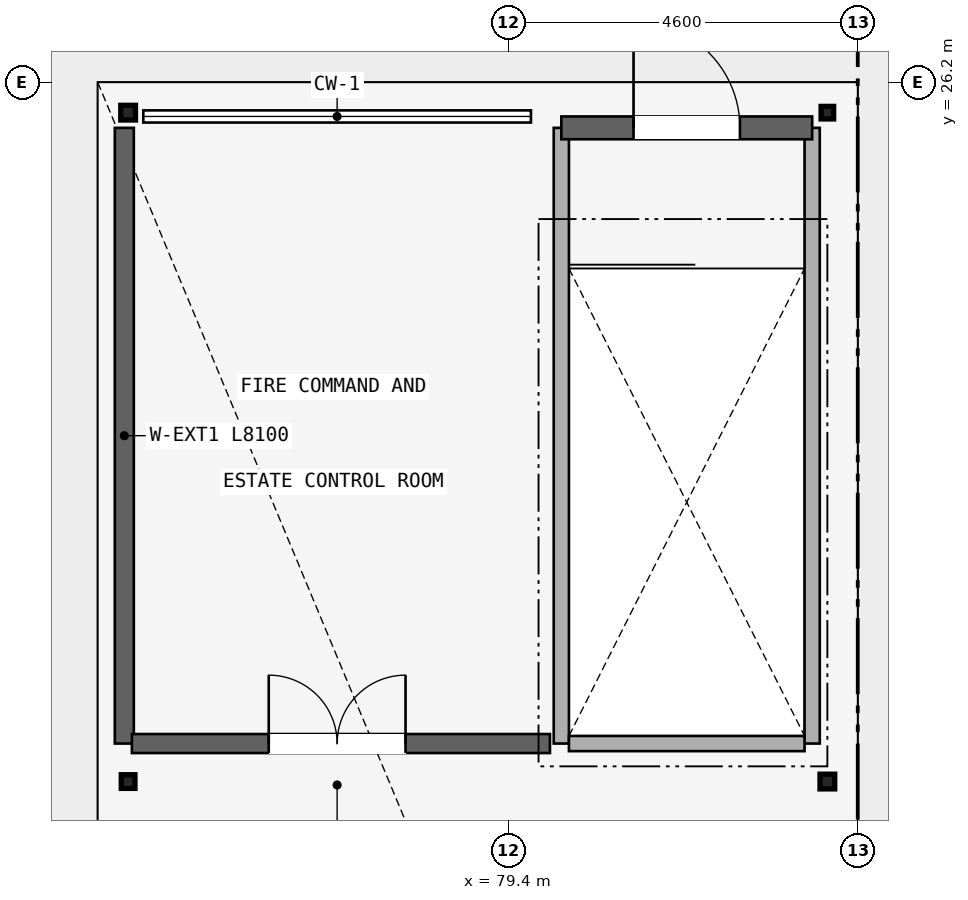
"""IFC4 building model, lengths in metres.
Left out: names, types, materials, properties, quantities, classifications, styles, units other than length and angle.
Written with IfcOpenShell. Run it as: python <this file> out.ifc"""

import sys

from ifc_helpers import new_model, si_unit, direction, frame, frame_2d, origin, origin_2d, place, context, subcontext, project, spatial, rectangle, hollow_rectangle, hollow_circle, extrude, element, fill, save


model = new_model("IFC4")
c1 = context("Model", 3, precision=1e-05, world=origin(), true_north=direction((0.0, 1.0)))
c2 = subcontext(c1, "Body", "Model", "MODEL_VIEW")
j1 = project(units=[si_unit("LENGTHUNIT", "METRE"), si_unit("PLANEANGLEUNIT", "RADIAN")], contexts=[c1])
p1 = place(None, origin())
s1 = spatial("IfcSite", under=j1, at=p1, CompositionType="ELEMENT")
p2 = place(p1, origin())
s2 = spatial("IfcBuilding", under=s1, at=p2, CompositionType="ELEMENT")
p3 = place(p2, origin())
s3 = spatial("IfcBuildingStorey", under=s2, at=p3, CompositionType="ELEMENT", Elevation=0.0)
p4 = place(p3, frame((74.4, 17.0, 0.0), z_axis=(0.0, 0.0, 1.0), x_axis=(1.0, 0.0, 0.0)))
e1 = element("IfcColumn", 1, at=p4, inside=s3, PredefinedType="COLUMN", context=c2, shape_type="SweptSolid", body=[
    extrude(hollow_rectangle(XDim=0.18, YDim=0.18, WallThickness=0.008, at=origin_2d()), origin(), (0.0, 0.0, 1.0), 4.26),
])
for number, where, z_axis, x_axis in (
    (2, (83.6, 17.0, 0.0), (0.0, 0.0, 1.0), (1.0, 0.0, 0.0)),
    (3, (74.4, 25.8, 0.0), (0.0, 0.0, 1.0), (1.0, 0.0, 0.0)),
):
    element("IfcColumn", number, at=place(p3, frame(where, z_axis=z_axis, x_axis=x_axis)), inside=s3, PredefinedType="COLUMN", context=c2, shape_type="SweptSolid", body=[
        extrude(hollow_circle(Radius=0.097, WallThickness=0.006, at=origin_2d()), origin(), (0.0, 0.0, 1.0), 4.26),
    ])
p5 = place(p3, frame((83.6, 25.8, 0.0), z_axis=(0.0, 0.0, 1.0), x_axis=(1.0, 0.0, 0.0)))
e4 = element("IfcColumn", 4, at=p5, inside=s3, PredefinedType="COLUMN", context=c2, shape_type="SweptSolid", body=[
    extrude(hollow_circle(Radius=0.083, WallThickness=0.005, at=origin_2d()), origin(), (0.0, 0.0, 1.0), 4.26),
])
for number, where, z_axis, x_axis in (
    (5, (80.1, 17.5, 0.0), (0.0, 0.0, 1.0), (0.0, 1.0, 0.0)),
    (6, (83.4, 17.5, 0.0), (0.0, 0.0, 1.0), (0.0, 1.0, 0.0)),
):
    element("IfcWall", number, at=place(p3, frame(where, z_axis=z_axis, x_axis=x_axis)), inside=s3, PredefinedType="STANDARD", context=c2, shape_type="SweptSolid", body=[
        extrude(rectangle(XDim=8.1, YDim=0.2, at=frame_2d((4.05, 0.0))), origin(), (0.0, 0.0, 1.0), 4.18),
    ])
p6 = place(p3, frame((80.2, 17.5, 0.0), z_axis=(0.0, 0.0, 1.0), x_axis=(1.0, 0.0, 0.0)))
e7 = element("IfcWall", 7, at=p6, inside=s3, PredefinedType="STANDARD", context=c2, shape_type="SweptSolid", body=[
    extrude(rectangle(XDim=3.1, YDim=0.2, at=frame_2d((1.55, 0.0))), origin(), (0.0, 0.0, 1.0), 4.18),
])
p7 = place(p3, frame((74.35, 17.5, 0.0), z_axis=(0.0, 0.0, 1.0), x_axis=(0.0, 1.0, 0.0)))
e8 = element("IfcWall", 8, at=p7, inside=s3, PredefinedType="STANDARD", context=c2, shape_type="SweptSolid", body=[
    extrude(rectangle(XDim=8.1, YDim=0.25, at=frame_2d((4.05, 0.0))), origin(), (0.0, 0.0, 1.0), 3.82),
])
p8 = place(p3, frame((74.45, 17.5, 0.0), z_axis=(0.0, 0.0, 1.0), x_axis=(1.0, 0.0, 0.0)))
e9 = element("IfcWall", 9, at=p8, inside=s3, PredefinedType="STANDARD", context=c2, shape_type="SweptSolid", body=[
    extrude(rectangle(XDim=5.5, YDim=0.25, at=frame_2d((2.75, 0.0))), origin(), (0.0, 0.0, 1.0), 4.18),
])
p9 = place(p8, frame((1.8, 0.0, 0.0)))
e10 = element("IfcOpeningElement", 10, at=p9, cuts=e9, PredefinedType="OPENING", context=c2, shape_type="SweptSolid", body=[
    extrude(rectangle(XDim=1.8, YDim=2.2, at=frame_2d((0.9, 1.1))), frame((0.0, 0.135, 0.0), z_axis=(0.0, -1.0, 0.0), x_axis=(1.0, 0.0, 0.0)), (0.0, 0.0, 1.0), 0.27),
])
p10 = place(p3, frame((80.1, 25.6, 0.0), z_axis=(0.0, 0.0, 1.0), x_axis=(1.0, 0.0, 0.0)))
e11 = element("IfcWall", 11, at=p10, inside=s3, PredefinedType="STANDARD", context=c2, shape_type="SweptSolid", body=[
    extrude(rectangle(XDim=3.3, YDim=0.3, at=frame_2d((1.65, 0.0))), origin(), (0.0, 0.0, 1.0), 4.1),
])
p11 = place(p10, frame((0.95, 0.0, 0.0)))
e12 = element("IfcOpeningElement", 12, at=p11, cuts=e11, PredefinedType="OPENING", context=c2, shape_type="SweptSolid", body=[
    extrude(rectangle(XDim=1.4, YDim=2.15, at=frame_2d((0.7, 1.075))), frame((0.0, 0.16, 0.0), z_axis=(0.0, -1.0, 0.0), x_axis=(1.0, 0.0, 0.0)), (0.0, 0.0, 1.0), 0.32),
])
p12 = place(p11, origin())
e13 = element("IfcDoor", 13, at=p12, inside=s3, OperationType="SINGLE_SWING_LEFT", PredefinedType="DOOR", context=c2, shape_type="SweptSolid", body=[
    extrude(rectangle(XDim=1.4, YDim=2.15, at=frame_2d((0.7, 1.075))), frame((0.0, 0.025, 0.0), z_axis=(0.0, -1.0, 0.0), x_axis=(1.0, 0.0, 0.0)), (0.0, 0.0, 1.0), 0.05),
])
fill(e12, e13)
p13 = place(p9, origin())
e14 = element("IfcDoor", 14, at=p13, inside=s3, OperationType="DOUBLE_DOOR_SINGLE_SWING", PredefinedType="DOOR", context=c2, shape_type="SweptSolid", body=[
    extrude(rectangle(XDim=1.8, YDim=2.2, at=frame_2d((0.9, 1.1))), frame((0.0, 0.025, 0.0), z_axis=(0.0, -1.0, 0.0), x_axis=(1.0, 0.0, 0.0)), (0.0, 0.0, 1.0), 0.05),
])
fill(e10, e14)
save(model, sys.argv[1])
